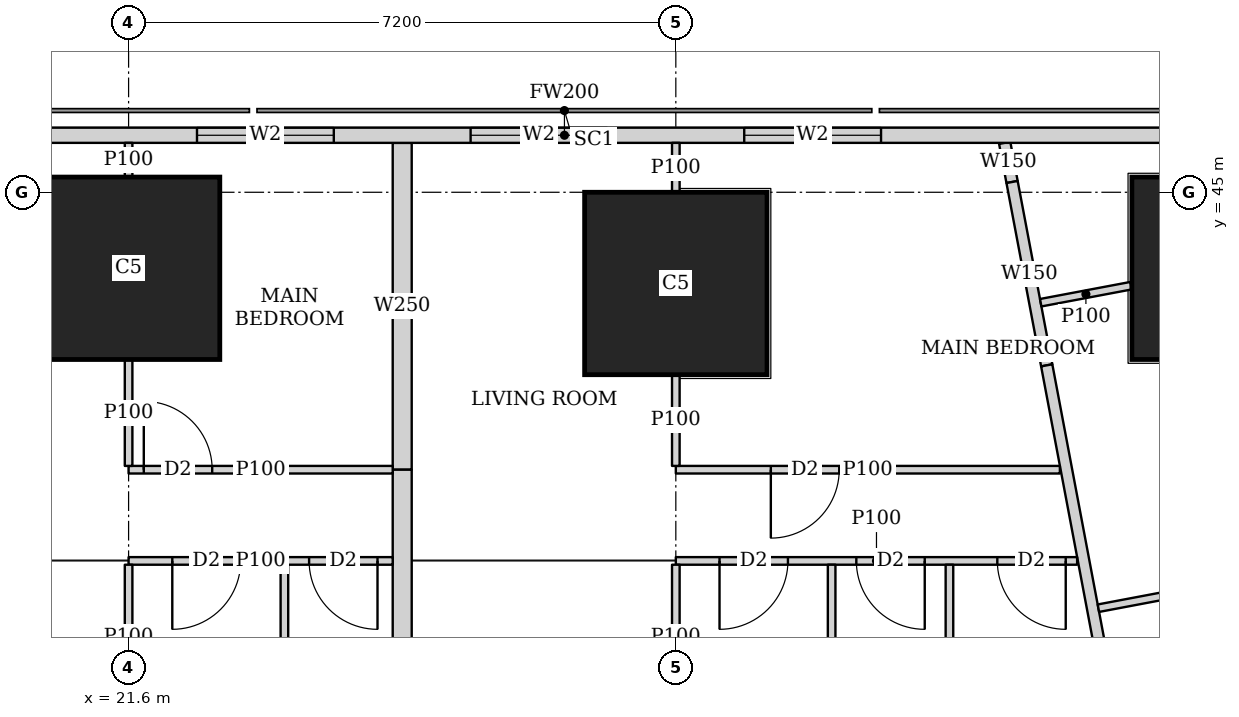
"""IFC4 building model, lengths in metres.
Left out: names, types, materials, properties, quantities, classifications, styles, units other than length and angle.
Written with IfcOpenShell. Run it as: python <this file> out.ifc"""

import sys

from ifc_helpers import new_model, si_unit, direction, frame, frame_2d, origin, origin_2d, place, context, subcontext, project, spatial, rectangle, extrude, element, fill, save


model = new_model("IFC4")
c1 = context("Model", 3, precision=1e-05, world=origin(), true_north=direction((0.0, 1.0)))
c2 = subcontext(c1, "Body", "Model", "MODEL_VIEW")
j1 = project(units=[si_unit("LENGTHUNIT", "METRE"), si_unit("PLANEANGLEUNIT", "RADIAN")], contexts=[c1])
p1 = place(None, origin())
s1 = spatial("IfcSite", under=j1, at=p1, CompositionType="ELEMENT")
p2 = place(p1, origin())
s2 = spatial("IfcBuilding", under=s1, at=p2, CompositionType="ELEMENT")
p3 = place(p2, frame((0.0, 0.0, 223.7)))
s3 = spatial("IfcBuildingStorey", under=s2, at=p3, CompositionType="ELEMENT", Elevation=223.7)
for number, where, z_axis, x_axis in (
    (1, (21.6, 44.0, 0.0), (0.0, 0.0, 1.0), (1.0, 0.0, 0.0)),
    (2, (28.8, 43.8, 0.0), (0.0, 0.0, 1.0), (1.0, 0.0, 0.0)),
    (3, (36.0, 44.0, 0.0), (0.0, 0.0, 1.0), (1.0, 0.0, 0.0)),
):
    element("IfcColumn", number, at=place(p3, frame(where, z_axis=z_axis, x_axis=x_axis)), inside=s3, PredefinedType="COLUMN", context=c2, shape_type="SweptSolid", body=[
        extrude(rectangle(XDim=2.4, YDim=2.4, at=origin_2d()), origin(), (0.0, 0.0, 1.0), 3.75),
    ])
p4 = place(p3, frame((40.106, 45.75, 0.0), z_axis=(0.0, 0.0, 1.0), x_axis=(-1.0, 0.0, 0.0)))
e4 = element("IfcWall", 4, at=p4, inside=s3, PredefinedType="SOLIDWALL", context=c2, shape_type="SweptSolid", body=[
    extrude(rectangle(XDim=25.543, YDim=0.2, at=frame_2d((12.771, 0.0))), origin(), (0.0, 0.0, 1.0), 3.5),
])
p5 = place(p4, frame((8.606, 0.0, 0.9)))
e5 = element("IfcOpeningElement", 5, at=p5, cuts=e4, PredefinedType="OPENING", context=c2, shape_type="SweptSolid", body=[
    extrude(rectangle(XDim=1.8, YDim=1.5, at=frame_2d((0.9, 0.75))), frame((0.0, 0.11, 0.0), z_axis=(0.0, -1.0, 0.0), x_axis=(1.0, 0.0, 0.0)), (0.0, 0.0, 1.0), 0.22),
])
p6 = place(p4, frame((12.206, 0.0, 0.9)))
e6 = element("IfcOpeningElement", 6, at=p6, cuts=e4, PredefinedType="OPENING", context=c2, shape_type="SweptSolid", body=[
    extrude(rectangle(XDim=1.8, YDim=1.5, at=frame_2d((0.9, 0.75))), frame((0.0, 0.11, 0.0), z_axis=(0.0, -1.0, 0.0), x_axis=(1.0, 0.0, 0.0)), (0.0, 0.0, 1.0), 0.22),
])
p7 = place(p4, frame((15.806, 0.0, 0.9)))
e7 = element("IfcOpeningElement", 7, at=p7, cuts=e4, PredefinedType="OPENING", context=c2, shape_type="SweptSolid", body=[
    extrude(rectangle(XDim=1.8, YDim=1.5, at=frame_2d((0.9, 0.75))), frame((0.0, 0.11, 0.0), z_axis=(0.0, -1.0, 0.0), x_axis=(1.0, 0.0, 0.0)), (0.0, 0.0, 1.0), 0.22),
])
p8 = place(p4, frame((20.825, 0.0, 0.9)))
e8 = element("IfcOpeningElement", 8, at=p8, cuts=e4, PredefinedType="OPENING", context=c2, shape_type="SweptSolid", body=[
    extrude(rectangle(XDim=2.4, YDim=1.5, at=frame_2d((1.2, 0.75))), frame((0.0, 0.11, 0.0), z_axis=(0.0, -1.0, 0.0), x_axis=(1.0, 0.0, 0.0)), (0.0, 0.0, 1.0), 0.22),
])
p9 = place(p3, frame((33.127, 45.65, 0.0), z_axis=(0.0, 0.0, 1.0), x_axis=(0.185441815104, -0.982655246366, 0.0)))
e9 = element("IfcWall", 9, at=p9, inside=s3, PredefinedType="SOLIDWALL", context=c2, shape_type="SweptSolid", body=[
    extrude(rectangle(XDim=0.524, YDim=0.15, at=frame_2d((0.262, 0.0))), origin(), (0.0, 0.0, 1.0), 3.5),
])
p10 = place(p3, frame((33.224, 45.135, 0.0), z_axis=(0.0, 0.0, 1.0), x_axis=(0.185681462868, -0.982609990967, 0.0)))
e10 = element("IfcWall", 10, at=p10, inside=s3, PredefinedType="SOLIDWALL", context=c2, shape_type="SweptSolid", body=[
    extrude(rectangle(XDim=2.455, YDim=0.15, at=frame_2d((1.228, 0.0))), origin(), (0.0, 0.0, 1.0), 2.05),
])
p11 = place(p3, frame((33.68, 42.723, 0.0), z_axis=(0.0, 0.0, 1.0), x_axis=(0.185601160014, -0.982625162207, 0.0)))
e11 = element("IfcWall", 11, at=p11, inside=s3, PredefinedType="SOLIDWALL", context=c2, shape_type="SweptSolid", body=[
    extrude(rectangle(XDim=41.051, YDim=0.15, at=frame_2d((20.526, 0.0))), origin(), (0.0, 0.0, 1.0), 2.5),
])
p12 = place(p11, frame((16.123, 0.0, 0.0)))
e12 = element("IfcOpeningElement", 12, at=p12, cuts=e11, PredefinedType="OPENING", context=c2, shape_type="SweptSolid", body=[
    extrude(rectangle(XDim=1.0, YDim=2.1, at=frame_2d((0.5, 1.05))), frame((0.0, 0.085, 0.0), z_axis=(0.0, -1.0, 0.0), x_axis=(1.0, 0.0, 0.0)), (0.0, 0.0, 1.0), 0.17),
])
p13 = place(p11, frame((19.938, 0.0, 0.0)))
e13 = element("IfcOpeningElement", 13, at=p13, cuts=e11, PredefinedType="OPENING", context=c2, shape_type="SweptSolid", body=[
    extrude(rectangle(XDim=1.0, YDim=2.1, at=frame_2d((0.5, 1.05))), frame((0.0, 0.085, 0.0), z_axis=(0.0, -1.0, 0.0), x_axis=(1.0, 0.0, 0.0)), (0.0, 0.0, 1.0), 0.17),
])
p14 = place(p11, frame((30.902, 0.0, 0.0)))
e14 = element("IfcOpeningElement", 14, at=p14, cuts=e11, PredefinedType="OPENING", context=c2, shape_type="SweptSolid", body=[
    extrude(rectangle(XDim=1.0, YDim=2.1, at=frame_2d((0.5, 1.05))), frame((0.0, 0.085, 0.0), z_axis=(0.0, -1.0, 0.0), x_axis=(1.0, 0.0, 0.0)), (0.0, 0.0, 1.0), 0.17),
])
p15 = place(p3, frame((34.79, 43.771, 0.0), z_axis=(0.0, 0.0, 1.0), x_axis=(-0.982730261052, -0.18504387051, 0.0)))
e15 = element("IfcWall", 15, at=p15, inside=s3, PredefinedType="PARTITIONING", context=c2, shape_type="SweptSolid", body=[
    extrude(rectangle(XDim=1.21, YDim=0.1, at=frame_2d((0.605, 0.0))), origin(), (0.0, 0.0, 1.0), 2.05),
])
p16 = place(p3, frame((37.824, 40.182, 0.0), z_axis=(0.0, 0.0, 1.0), x_axis=(-0.982648794755, -0.185475998897, 0.0)))
e16 = element("IfcWall", 16, at=p16, inside=s3, PredefinedType="PARTITIONING", context=c2, shape_type="SweptSolid", body=[
    extrude(rectangle(XDim=3.525, YDim=0.1, at=frame_2d((1.763, 0.0))), origin(), (0.0, 0.0, 1.0), 3.5),
])
p17 = place(p3, frame((21.6, 41.35, 0.0), z_axis=(0.0, 0.0, 1.0), x_axis=(1.0, 0.0, 0.0)))
e17 = element("IfcWall", 17, at=p17, inside=s3, PredefinedType="PARTITIONING", context=c2, shape_type="SweptSolid", body=[
    extrude(rectangle(XDim=3.475, YDim=0.1, at=frame_2d((1.737, 0.0))), origin(), (0.0, 0.0, 1.0), 3.5),
])
p18 = place(p17, frame((0.2, 0.0, 0.0)))
e18 = element("IfcOpeningElement", 18, at=p18, cuts=e17, PredefinedType="OPENING", context=c2, shape_type="SweptSolid", body=[
    extrude(rectangle(XDim=0.9, YDim=2.1, at=frame_2d((0.45, 1.05))), frame((0.0, 0.06, 0.0), z_axis=(0.0, -1.0, 0.0), x_axis=(1.0, 0.0, 0.0)), (0.0, 0.0, 1.0), 0.12),
])
p19 = place(p3, frame((21.6, 40.15, 0.0), z_axis=(0.0, 0.0, 1.0), x_axis=(1.0, 0.0, 0.0)))
e19 = element("IfcWall", 19, at=p19, inside=s3, PredefinedType="PARTITIONING", context=c2, shape_type="SweptSolid", body=[
    extrude(rectangle(XDim=3.475, YDim=0.1, at=frame_2d((1.737, 0.0))), origin(), (0.0, 0.0, 1.0), 3.5),
])
p20 = place(p19, frame((0.575, 0.0, 0.0)))
e20 = element("IfcOpeningElement", 20, at=p20, cuts=e19, PredefinedType="OPENING", context=c2, shape_type="SweptSolid", body=[
    extrude(rectangle(XDim=0.9, YDim=2.1, at=frame_2d((0.45, 1.05))), frame((0.0, 0.06, 0.0), z_axis=(0.0, -1.0, 0.0), x_axis=(1.0, 0.0, 0.0)), (0.0, 0.0, 1.0), 0.12),
])
p21 = place(p19, frame((2.375, 0.0, 0.0)))
e21 = element("IfcOpeningElement", 21, at=p21, cuts=e19, PredefinedType="OPENING", context=c2, shape_type="SweptSolid", body=[
    extrude(rectangle(XDim=0.9, YDim=2.1, at=frame_2d((0.45, 1.05))), frame((0.0, 0.06, 0.0), z_axis=(0.0, -1.0, 0.0), x_axis=(1.0, 0.0, 0.0)), (0.0, 0.0, 1.0), 0.12),
])
p22 = place(p3, frame((21.6, 41.4, 0.0), z_axis=(0.0, 0.0, 1.0), x_axis=(0.0, 1.0, 0.0)))
e22 = element("IfcWall", 22, at=p22, inside=s3, PredefinedType="PARTITIONING", context=c2, shape_type="SweptSolid", body=[
    extrude(rectangle(XDim=1.399, YDim=0.1, at=frame_2d((0.7, 0.0))), origin(), (0.0, 0.0, 1.0), 3.5),
])
p23 = place(p3, frame((21.6, 45.201, 0.0), z_axis=(0.0, 0.0, 1.0), x_axis=(0.0, 1.0, 0.0)))
e23 = element("IfcWall", 23, at=p23, inside=s3, PredefinedType="PARTITIONING", context=c2, shape_type="SweptSolid", body=[
    extrude(rectangle(XDim=0.449, YDim=0.1, at=frame_2d((0.225, 0.0))), origin(), (0.0, 0.0, 1.0), 3.5),
])
p24 = place(p3, frame((21.6, 38.201, 0.0), z_axis=(0.0, 0.0, 1.0), x_axis=(0.0, 1.0, 0.0)))
e24 = element("IfcWall", 24, at=p24, inside=s3, PredefinedType="PARTITIONING", context=c2, shape_type="SweptSolid", body=[
    extrude(rectangle(XDim=1.899, YDim=0.1, at=frame_2d((0.95, 0.0))), origin(), (0.0, 0.0, 1.0), 3.5),
])
p25 = place(p3, frame((23.65, 36.575, 0.0), z_axis=(0.0, 0.0, 1.0), x_axis=(0.0, 1.0, 0.0)))
e25 = element("IfcWall", 25, at=p25, inside=s3, PredefinedType="PARTITIONING", context=c2, shape_type="SweptSolid", body=[
    extrude(rectangle(XDim=3.525, YDim=0.1, at=frame_2d((1.763, 0.0))), origin(), (0.0, 0.0, 1.0), 3.5),
])
p26 = place(p3, frame((28.8, 41.35, 0.0), z_axis=(0.0, 0.0, 1.0), x_axis=(1.0, 0.0, 0.0)))
e26 = element("IfcWall", 26, at=p26, inside=s3, PredefinedType="PARTITIONING", context=c2, shape_type="SweptSolid", body=[
    extrude(rectangle(XDim=5.053, YDim=0.1, at=frame_2d((2.526, 0.0))), origin(), (0.0, 0.0, 1.0), 3.5),
])
p27 = place(p26, frame((1.25, 0.0, 0.0)))
e27 = element("IfcOpeningElement", 27, at=p27, cuts=e26, PredefinedType="OPENING", context=c2, shape_type="SweptSolid", body=[
    extrude(rectangle(XDim=0.9, YDim=2.1, at=frame_2d((0.45, 1.05))), frame((0.0, 0.06, 0.0), z_axis=(0.0, -1.0, 0.0), x_axis=(1.0, 0.0, 0.0)), (0.0, 0.0, 1.0), 0.12),
])
p28 = place(p3, frame((28.8, 40.15, 0.0), z_axis=(0.0, 0.0, 1.0), x_axis=(1.0, 0.0, 0.0)))
e28 = element("IfcWall", 28, at=p28, inside=s3, PredefinedType="PARTITIONING", context=c2, shape_type="SweptSolid", body=[
    extrude(rectangle(XDim=5.28, YDim=0.1, at=frame_2d((2.64, 0.0))), origin(), (0.0, 0.0, 1.0), 3.5),
])
p29 = place(p28, frame((0.575, 0.0, 0.0)))
e29 = element("IfcOpeningElement", 29, at=p29, cuts=e28, PredefinedType="OPENING", context=c2, shape_type="SweptSolid", body=[
    extrude(rectangle(XDim=0.9, YDim=2.1, at=frame_2d((0.45, 1.05))), frame((0.0, 0.06, 0.0), z_axis=(0.0, -1.0, 0.0), x_axis=(1.0, 0.0, 0.0)), (0.0, 0.0, 1.0), 0.12),
])
p30 = place(p28, frame((4.23, 0.0, 0.0)))
e30 = element("IfcOpeningElement", 30, at=p30, cuts=e28, PredefinedType="OPENING", context=c2, shape_type="SweptSolid", body=[
    extrude(rectangle(XDim=0.9, YDim=2.1, at=frame_2d((0.45, 1.05))), frame((0.0, 0.06, 0.0), z_axis=(0.0, -1.0, 0.0), x_axis=(1.0, 0.0, 0.0)), (0.0, 0.0, 1.0), 0.12),
])
p31 = place(p28, frame((2.375, 0.0, 0.0)))
e31 = element("IfcOpeningElement", 31, at=p31, cuts=e28, PredefinedType="OPENING", context=c2, shape_type="SweptSolid", body=[
    extrude(rectangle(XDim=0.9, YDim=2.1, at=frame_2d((0.45, 1.05))), frame((0.0, 0.06, 0.0), z_axis=(0.0, -1.0, 0.0), x_axis=(1.0, 0.0, 0.0)), (0.0, 0.0, 1.0), 0.12),
])
p32 = place(p3, frame((28.8, 41.4, 0.0), z_axis=(0.0, 0.0, 1.0), x_axis=(0.0, 1.0, 0.0)))
e32 = element("IfcWall", 32, at=p32, inside=s3, PredefinedType="PARTITIONING", context=c2, shape_type="SweptSolid", body=[
    extrude(rectangle(XDim=1.199, YDim=0.1, at=frame_2d((0.6, 0.0))), origin(), (0.0, 0.0, 1.0), 3.5),
])
p33 = place(p3, frame((28.8, 45.001, 0.0), z_axis=(0.0, 0.0, 1.0), x_axis=(0.0, 1.0, 0.0)))
e33 = element("IfcWall", 33, at=p33, inside=s3, PredefinedType="PARTITIONING", context=c2, shape_type="SweptSolid", body=[
    extrude(rectangle(XDim=0.649, YDim=0.1, at=frame_2d((0.324, 0.0))), origin(), (0.0, 0.0, 1.0), 3.5),
])
p34 = place(p3, frame((28.8, 38.201, 0.0), z_axis=(0.0, 0.0, 1.0), x_axis=(0.0, 1.0, 0.0)))
e34 = element("IfcWall", 34, at=p34, inside=s3, PredefinedType="PARTITIONING", context=c2, shape_type="SweptSolid", body=[
    extrude(rectangle(XDim=1.899, YDim=0.1, at=frame_2d((0.95, 0.0))), origin(), (0.0, 0.0, 1.0), 3.5),
])
for number, where, z_axis, x_axis in (
    (35, (32.4, 36.575, 0.0), (0.0, 0.0, 1.0), (0.0, 1.0, 0.0)),
    (36, (30.85, 36.575, 0.0), (0.0, 0.0, 1.0), (0.0, 1.0, 0.0)),
):
    element("IfcWall", number, at=place(p3, frame(where, z_axis=z_axis, x_axis=x_axis)), inside=s3, PredefinedType="PARTITIONING", context=c2, shape_type="SweptSolid", body=[
        extrude(rectangle(XDim=3.525, YDim=0.1, at=frame_2d((1.763, 0.0))), origin(), (0.0, 0.0, 1.0), 3.5),
    ])
p35 = place(p3, frame((25.2, 41.35, 0.0), z_axis=(0.0, 0.0, 1.0), x_axis=(0.0, 1.0, 0.0)))
e37 = element("IfcWall", 37, at=p35, inside=s3, PredefinedType="SOLIDWALL", context=c2, shape_type="SweptSolid", body=[
    extrude(rectangle(XDim=4.3, YDim=0.25, at=frame_2d((2.15, 0.0))), origin(), (0.0, 0.0, 1.0), 2.05),
])
p36 = place(p3, frame((25.2, 36.575, 0.0), z_axis=(0.0, 0.0, 1.0), x_axis=(0.0, 1.0, 0.0)))
e38 = element("IfcWall", 38, at=p36, inside=s3, PredefinedType="SOLIDWALL", context=c2, shape_type="SweptSolid", body=[
    extrude(rectangle(XDim=4.775, YDim=0.25, at=frame_2d((2.388, 0.0))), origin(), (0.0, 0.0, 1.0), 3.5),
])
p37 = place(p5, origin())
e39 = element("IfcWindow", 39, at=p37, inside=s3, PartitioningType="SINGLE_PANEL", PredefinedType="WINDOW", context=c2, shape_type="SweptSolid", body=[
    extrude(rectangle(XDim=1.8, YDim=1.5, at=frame_2d((0.9, 0.75))), frame((0.0, 0.03, 0.0), z_axis=(0.0, -1.0, 0.0), x_axis=(1.0, 0.0, 0.0)), (0.0, 0.0, 1.0), 0.06),
])
fill(e5, e39)
p38 = place(p6, origin())
e40 = element("IfcWindow", 40, at=p38, inside=s3, PartitioningType="SINGLE_PANEL", PredefinedType="WINDOW", context=c2, shape_type="SweptSolid", body=[
    extrude(rectangle(XDim=1.8, YDim=1.5, at=frame_2d((0.9, 0.75))), frame((0.0, 0.03, 0.0), z_axis=(0.0, -1.0, 0.0), x_axis=(1.0, 0.0, 0.0)), (0.0, 0.0, 1.0), 0.06),
])
fill(e6, e40)
p39 = place(p7, origin())
e41 = element("IfcWindow", 41, at=p39, inside=s3, PartitioningType="SINGLE_PANEL", PredefinedType="WINDOW", context=c2, shape_type="SweptSolid", body=[
    extrude(rectangle(XDim=1.8, YDim=1.5, at=frame_2d((0.9, 0.75))), frame((0.0, 0.03, 0.0), z_axis=(0.0, -1.0, 0.0), x_axis=(1.0, 0.0, 0.0)), (0.0, 0.0, 1.0), 0.06),
])
fill(e7, e41)
p40 = place(p18, origin())
e42 = element("IfcDoor", 42, at=p40, inside=s3, OperationType="SINGLE_SWING_LEFT", PredefinedType="DOOR", context=c2, shape_type="SweptSolid", body=[
    extrude(rectangle(XDim=0.9, YDim=2.1, at=frame_2d((0.45, 1.05))), frame((0.0, 0.025, 0.0), z_axis=(0.0, -1.0, 0.0), x_axis=(1.0, 0.0, 0.0)), (0.0, 0.0, 1.0), 0.05),
])
fill(e18, e42)
p41 = place(p20, origin())
e43 = element("IfcDoor", 43, at=p41, inside=s3, OperationType="SINGLE_SWING_RIGHT", PredefinedType="DOOR", context=c2, shape_type="SweptSolid", body=[
    extrude(rectangle(XDim=0.9, YDim=2.1, at=frame_2d((0.45, 1.05))), frame((0.0, 0.025, 0.0), z_axis=(0.0, -1.0, 0.0), x_axis=(1.0, 0.0, 0.0)), (0.0, 0.0, 1.0), 0.05),
])
fill(e20, e43)
p42 = place(p21, origin())
e44 = element("IfcDoor", 44, at=p42, inside=s3, OperationType="SINGLE_SWING_LEFT", PredefinedType="DOOR", context=c2, shape_type="SweptSolid", body=[
    extrude(rectangle(XDim=0.9, YDim=2.1, at=frame_2d((0.45, 1.05))), frame((0.0, 0.025, 0.0), z_axis=(0.0, -1.0, 0.0), x_axis=(1.0, 0.0, 0.0)), (0.0, 0.0, 1.0), 0.05),
])
fill(e21, e44)
p43 = place(p27, origin())
e45 = element("IfcDoor", 45, at=p43, inside=s3, OperationType="SINGLE_SWING_RIGHT", PredefinedType="DOOR", context=c2, shape_type="SweptSolid", body=[
    extrude(rectangle(XDim=0.9, YDim=2.1, at=frame_2d((0.45, 1.05))), frame((0.0, 0.025, 0.0), z_axis=(0.0, -1.0, 0.0), x_axis=(1.0, 0.0, 0.0)), (0.0, 0.0, 1.0), 0.05),
])
fill(e27, e45)
p44 = place(p29, origin())
e46 = element("IfcDoor", 46, at=p44, inside=s3, OperationType="SINGLE_SWING_RIGHT", PredefinedType="DOOR", context=c2, shape_type="SweptSolid", body=[
    extrude(rectangle(XDim=0.9, YDim=2.1, at=frame_2d((0.45, 1.05))), frame((0.0, 0.025, 0.0), z_axis=(0.0, -1.0, 0.0), x_axis=(1.0, 0.0, 0.0)), (0.0, 0.0, 1.0), 0.05),
])
fill(e29, e46)
p45 = place(p30, origin())
e47 = element("IfcDoor", 47, at=p45, inside=s3, OperationType="SINGLE_SWING_LEFT", PredefinedType="DOOR", context=c2, shape_type="SweptSolid", body=[
    extrude(rectangle(XDim=0.9, YDim=2.1, at=frame_2d((0.45, 1.05))), frame((0.0, 0.025, 0.0), z_axis=(0.0, -1.0, 0.0), x_axis=(1.0, 0.0, 0.0)), (0.0, 0.0, 1.0), 0.05),
])
fill(e30, e47)
p46 = place(p31, origin())
e48 = element("IfcDoor", 48, at=p46, inside=s3, OperationType="SINGLE_SWING_LEFT", PredefinedType="DOOR", context=c2, shape_type="SweptSolid", body=[
    extrude(rectangle(XDim=0.9, YDim=2.1, at=frame_2d((0.45, 1.05))), frame((0.0, 0.025, 0.0), z_axis=(0.0, -1.0, 0.0), x_axis=(1.0, 0.0, 0.0)), (0.0, 0.0, 1.0), 0.05),
])
fill(e31, e48)
save(model, sys.argv[1])
